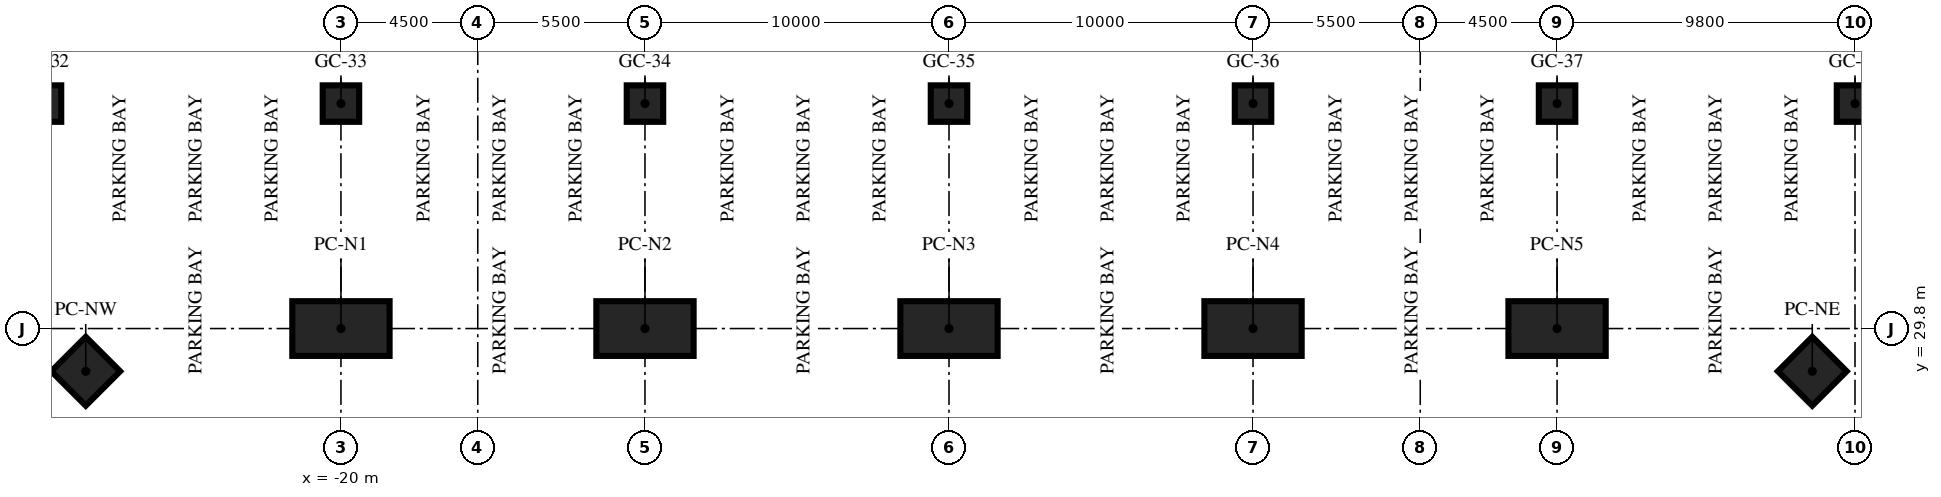
"""IFC4 building model, lengths in metres.
Left out: names, types, materials, properties, quantities, classifications, styles, units other than length and angle.
Written with IfcOpenShell. Run it as: python <this file> out.ifc"""

import sys

from ifc_helpers import new_model, si_unit, direction, frame, origin, origin_2d, place, context, subcontext, project, spatial, rectangle, hollow_rectangle, extrude, element, save


model = new_model("IFC4")
c1 = context("Model", 3, precision=1e-05, world=origin(), true_north=direction((0.0, 1.0)))
c2 = subcontext(c1, "Body", "Model", "MODEL_VIEW")
j1 = project(units=[si_unit("LENGTHUNIT", "METRE"), si_unit("PLANEANGLEUNIT", "RADIAN")], contexts=[c1])
p1 = place(None, origin())
s1 = spatial("IfcSite", under=j1, at=p1, CompositionType="ELEMENT")
p2 = place(p1, origin())
s2 = spatial("IfcBuilding", under=s1, at=p2, CompositionType="ELEMENT")
p3 = place(p2, frame((0.0, 0.0, -13.2)))
s3 = spatial("IfcBuildingStorey", under=s2, at=p3, CompositionType="ELEMENT", Elevation=-13.2)
for number, where, z_axis, x_axis in (
    (1, (-20.0, 29.8, -0.4), (0.0, 0.0, 1.0), (1.0, 0.0, 0.0)),
    (2, (-10.0, 29.8, -0.4), (0.0, 0.0, 1.0), (1.0, 0.0, 0.0)),
    (3, (0.0, 29.8, -0.4), (0.0, 0.0, 1.0), (1.0, 0.0, 0.0)),
    (4, (10.0, 29.8, -0.4), (0.0, 0.0, 1.0), (1.0, 0.0, 0.0)),
    (5, (20.0, 29.8, -0.4), (0.0, 0.0, 1.0), (1.0, 0.0, 0.0)),
):
    element("IfcColumn", number, at=place(p3, frame(where, z_axis=z_axis, x_axis=x_axis)), inside=s3, PredefinedType="COLUMN", context=c2, shape_type="SweptSolid", body=[
        extrude(hollow_rectangle(XDim=3.2, YDim=1.8, WallThickness=0.2, at=origin_2d()), origin(), (0.0, 0.0, 1.0), 4.6),
    ])
for number, where, z_axis, x_axis in (
    (6, (28.394, 28.394, -0.4), (0.0, 0.0, 1.0), (0.707, -0.707, 0.0)),
    (7, (-28.394, 28.394, -0.4), (0.0, 0.0, 1.0), (0.707, 0.707, 0.0)),
):
    element("IfcColumn", number, at=place(p3, frame(where, z_axis=z_axis, x_axis=x_axis)), inside=s3, PredefinedType="COLUMN", context=c2, shape_type="SweptSolid", body=[
        extrude(hollow_rectangle(XDim=1.6, YDim=1.6, WallThickness=0.1, at=origin_2d()), origin(), (0.0, 0.0, 1.0), 4.6),
    ])
for number, where, z_axis, x_axis in (
    (8, (-29.8, 37.2, -0.4), (0.0, 0.0, 1.0), (1.0, 0.0, 0.0)),
    (9, (-20.0, 37.2, -0.4), (0.0, 0.0, 1.0), (1.0, 0.0, 0.0)),
    (10, (-10.0, 37.2, -0.4), (0.0, 0.0, 1.0), (1.0, 0.0, 0.0)),
    (11, (0.0, 37.2, -0.4), (0.0, 0.0, 1.0), (1.0, 0.0, 0.0)),
    (12, (10.0, 37.2, -0.4), (0.0, 0.0, 1.0), (1.0, 0.0, 0.0)),
    (13, (20.0, 37.2, -0.4), (0.0, 0.0, 1.0), (1.0, 0.0, 0.0)),
    (14, (29.8, 37.2, -0.4), (0.0, 0.0, 1.0), (1.0, 0.0, 0.0)),
):
    element("IfcColumn", number, at=place(p3, frame(where, z_axis=z_axis, x_axis=x_axis)), inside=s3, PredefinedType="COLUMN", context=c2, shape_type="SweptSolid", body=[
        extrude(rectangle(XDim=1.2, YDim=1.2, at=origin_2d()), origin(), (0.0, 0.0, 1.0), 4.6),
    ])
save(model, sys.argv[1])
